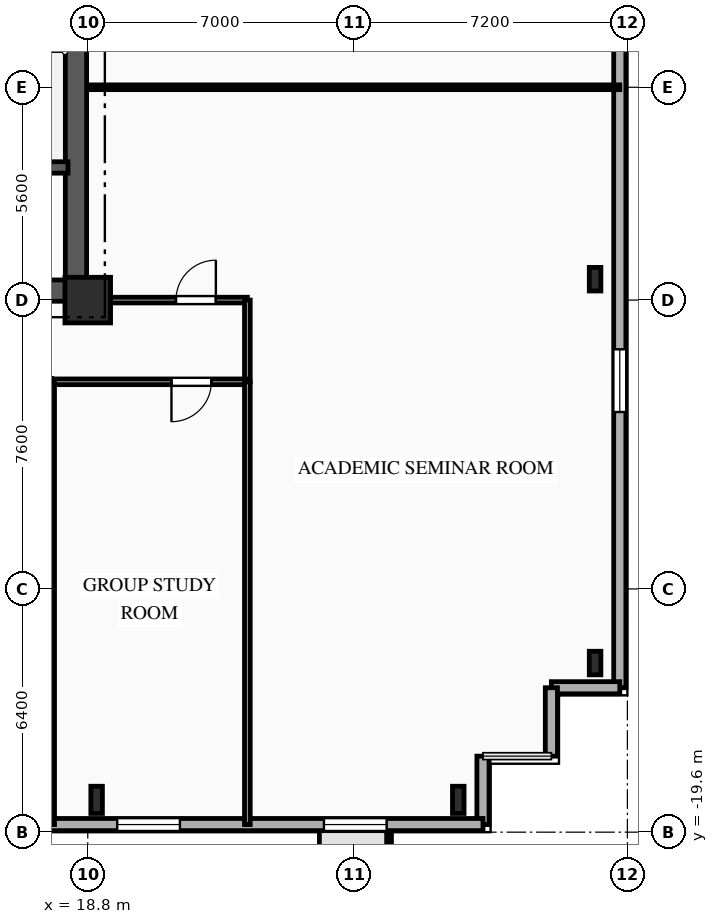
"""IFC4 building model, lengths in metres.
Left out: names, types, materials, properties, quantities, classifications, styles, units other than length and angle.
Written with IfcOpenShell. Run it as: python <this file> out.ifc"""

import sys

from ifc_helpers import new_model, si_unit, direction, frame, frame_2d, origin, origin_2d, place, context, subcontext, project, spatial, rectangle, i_section, extrude, element, fill, save


model = new_model("IFC4")
c1 = context("Model", 3, precision=1e-05, world=origin(), true_north=direction((0.0, 1.0)))
c2 = subcontext(c1, "Body", "Model", "MODEL_VIEW")
j1 = project(units=[si_unit("LENGTHUNIT", "METRE"), si_unit("PLANEANGLEUNIT", "RADIAN")], contexts=[c1])
p1 = place(None, origin())
s1 = spatial("IfcSite", under=j1, at=p1, CompositionType="ELEMENT")
p2 = place(p1, origin())
s2 = spatial("IfcBuilding", under=s1, at=p2, CompositionType="ELEMENT")
p3 = place(p2, frame((0.0, 0.0, 70.55)))
s3 = spatial("IfcBuildingStorey", under=s2, at=p3, CompositionType="ELEMENT", Elevation=70.55)
p4 = place(p3, frame((18.8, -5.6, 0.0), z_axis=(0.0, 0.0, 1.0), x_axis=(1.0, 0.0, 0.0)))
e1 = element("IfcColumn", 1, at=p4, inside=s3, PredefinedType="COLUMN", context=c2, shape_type="SweptSolid", body=[
    extrude(rectangle(XDim=1.2, YDim=1.2, at=origin_2d()), origin(), (0.0, 0.0, 1.0), 3.35),
])
for number, where, z_axis, x_axis in (
    (2, (19.033, -18.75, 0.0), (0.0, 0.0, 1.0), (1.0, 0.0, 0.0)),
    (3, (28.55, -18.75, 0.0), (0.0, 0.0, 1.0), (1.0, 0.0, 0.0)),
):
    element("IfcColumn", number, at=place(p3, frame(where, z_axis=z_axis, x_axis=x_axis)), inside=s3, PredefinedType="COLUMN", context=c2, shape_type="SweptSolid", body=[
        extrude(i_section(OverallWidth=0.304, OverallDepth=0.716, WebThickness=0.021, FlangeThickness=0.04, FilletRadius=0.027, at=origin_2d()), origin(), (0.0, 0.0, 1.0), 3.35),
    ])
for number, where, z_axis, x_axis in (
    (4, (32.15, -15.15, 0.0), (0.0, 0.0, 1.0), (1.0, 0.0, 0.0)),
    (5, (32.15, -5.05, 0.0), (0.0, 0.0, 1.0), (1.0, 0.0, 0.0)),
):
    element("IfcColumn", number, at=place(p3, frame(where, z_axis=z_axis, x_axis=x_axis)), inside=s3, PredefinedType="COLUMN", context=c2, shape_type="SweptSolid", body=[
        extrude(i_section(OverallWidth=0.305, OverallDepth=0.62, WebThickness=0.021, FlangeThickness=0.04, FilletRadius=0.027, at=origin_2d()), origin(), (0.0, 0.0, 1.0), 3.35),
    ])
p5 = place(p3, frame((32.8, 15.8, 0.0), z_axis=(0.0, 0.0, 1.0), x_axis=(0.0, -1.0, 0.0)))
e6 = element("IfcWall", 6, at=p5, inside=s3, PredefinedType="SOLIDWALL", context=c2, shape_type="SweptSolid", body=[
    extrude(rectangle(XDim=31.6, YDim=0.32, at=frame_2d((15.8, 0.0))), origin(), (0.0, 0.0, 1.0), 3.0),
])
p6 = place(p5, frame((7.36, 0.0, 0.85)))
e7 = element("IfcOpeningElement", 7, at=p6, cuts=e6, PredefinedType="OPENING", context=c2, shape_type="SweptSolid", body=[
    extrude(rectangle(XDim=1.6, YDim=1.85, at=frame_2d((0.8, 0.925))), frame((0.0, 0.17, 0.0), z_axis=(0.0, -1.0, 0.0), x_axis=(1.0, 0.0, 0.0)), (0.0, 0.0, 1.0), 0.34),
])
p7 = place(p5, frame((22.695, 0.0, 0.85)))
e8 = element("IfcOpeningElement", 8, at=p7, cuts=e6, PredefinedType="OPENING", context=c2, shape_type="SweptSolid", body=[
    extrude(rectangle(XDim=1.65, YDim=1.85, at=frame_2d((0.825, 0.925))), frame((0.0, 0.17, 0.0), z_axis=(0.0, -1.0, 0.0), x_axis=(1.0, 0.0, 0.0)), (0.0, 0.0, 1.0), 0.34),
])
for number, where, z_axis, x_axis in (
    (9, (32.8, -15.8, 0.0), (0.0, 0.0, 1.0), (-1.0, 0.0, 0.0)),
    (10, (31.0, -15.8, 0.0), (0.0, 0.0, 1.0), (0.0, -1.0, 0.0)),
):
    element("IfcWall", number, at=place(p3, frame(where, z_axis=z_axis, x_axis=x_axis)), inside=s3, PredefinedType="SOLIDWALL", context=c2, shape_type="SweptSolid", body=[
        extrude(rectangle(XDim=1.8, YDim=0.32, at=frame_2d((0.9, 0.0))), origin(), (0.0, 0.0, 1.0), 3.0),
    ])
p8 = place(p3, frame((29.2, -17.6, 0.0), z_axis=(0.0, 0.0, 1.0), x_axis=(0.0, -1.0, 0.0)))
e11 = element("IfcWall", 11, at=p8, inside=s3, PredefinedType="SOLIDWALL", context=c2, shape_type="SweptSolid", body=[
    extrude(rectangle(XDim=1.8, YDim=0.32, at=frame_2d((0.9, 0.0))), origin(), (0.0, 0.0, 1.0), 3.0),
])
p9 = place(p3, frame((29.2, -19.4, 0.0), z_axis=(0.0, 0.0, 1.0), x_axis=(-1.0, 0.0, 0.0)))
e12 = element("IfcWall", 12, at=p9, inside=s3, PredefinedType="SOLIDWALL", context=c2, shape_type="SweptSolid", body=[
    extrude(rectangle(XDim=58.4, YDim=0.32, at=frame_2d((29.2, 0.0))), origin(), (0.0, 0.0, 1.0), 3.0),
])
p10 = place(p9, frame((2.535, 0.0, 0.85)))
e13 = element("IfcOpeningElement", 13, at=p10, cuts=e12, PredefinedType="OPENING", context=c2, shape_type="SweptSolid", body=[
    extrude(rectangle(XDim=1.65, YDim=1.85, at=frame_2d((0.825, 0.925))), frame((0.0, 0.17, 0.0), z_axis=(0.0, -1.0, 0.0), x_axis=(1.0, 0.0, 0.0)), (0.0, 0.0, 1.0), 0.34),
])
p11 = place(p9, frame((7.975, 0.0, 0.85)))
e14 = element("IfcOpeningElement", 14, at=p11, cuts=e12, PredefinedType="OPENING", context=c2, shape_type="SweptSolid", body=[
    extrude(rectangle(XDim=1.65, YDim=1.85, at=frame_2d((0.825, 0.925))), frame((0.0, 0.17, 0.0), z_axis=(0.0, -1.0, 0.0), x_axis=(1.0, 0.0, 0.0)), (0.0, 0.0, 1.0), 0.34),
])
p12 = place(p9, frame((13.14, 0.0, 0.85)))
e15 = element("IfcOpeningElement", 15, at=p12, cuts=e12, PredefinedType="OPENING", context=c2, shape_type="SweptSolid", body=[
    extrude(rectangle(XDim=2.2, YDim=1.85, at=frame_2d((1.1, 0.925))), frame((0.0, 0.17, 0.0), z_axis=(0.0, -1.0, 0.0), x_axis=(1.0, 0.0, 0.0)), (0.0, 0.0, 1.0), 0.34),
])
p13 = place(p9, frame((19.992, 0.0, 0.85)))
e16 = element("IfcOpeningElement", 16, at=p13, cuts=e12, PredefinedType="OPENING", context=c2, shape_type="SweptSolid", body=[
    extrude(rectangle(XDim=2.2, YDim=1.85, at=frame_2d((1.1, 0.925))), frame((0.0, 0.17, 0.0), z_axis=(0.0, -1.0, 0.0), x_axis=(1.0, 0.0, 0.0)), (0.0, 0.0, 1.0), 0.34),
])
p14 = place(p9, frame((24.66, 0.0, 0.85)))
e17 = element("IfcOpeningElement", 17, at=p14, cuts=e12, PredefinedType="OPENING", context=c2, shape_type="SweptSolid", body=[
    extrude(rectangle(XDim=2.2, YDim=1.85, at=frame_2d((1.1, 0.925))), frame((0.0, 0.17, 0.0), z_axis=(0.0, -1.0, 0.0), x_axis=(1.0, 0.0, 0.0)), (0.0, 0.0, 1.0), 0.34),
])
p15 = place(p9, frame((30.42, 0.0, 0.85)))
e18 = element("IfcOpeningElement", 18, at=p15, cuts=e12, PredefinedType="OPENING", context=c2, shape_type="SweptSolid", body=[
    extrude(rectangle(XDim=2.2, YDim=1.85, at=frame_2d((1.1, 0.925))), frame((0.0, 0.17, 0.0), z_axis=(0.0, -1.0, 0.0), x_axis=(1.0, 0.0, 0.0)), (0.0, 0.0, 1.0), 0.34),
])
p16 = place(p9, frame((36.18, 0.0, 0.85)))
e19 = element("IfcOpeningElement", 19, at=p16, cuts=e12, PredefinedType="OPENING", context=c2, shape_type="SweptSolid", body=[
    extrude(rectangle(XDim=2.2, YDim=1.85, at=frame_2d((1.1, 0.925))), frame((0.0, 0.17, 0.0), z_axis=(0.0, -1.0, 0.0), x_axis=(1.0, 0.0, 0.0)), (0.0, 0.0, 1.0), 0.34),
])
p17 = place(p9, frame((41.94, 0.0, 0.85)))
e20 = element("IfcOpeningElement", 20, at=p17, cuts=e12, PredefinedType="OPENING", context=c2, shape_type="SweptSolid", body=[
    extrude(rectangle(XDim=2.2, YDim=1.85, at=frame_2d((1.1, 0.925))), frame((0.0, 0.17, 0.0), z_axis=(0.0, -1.0, 0.0), x_axis=(1.0, 0.0, 0.0)), (0.0, 0.0, 1.0), 0.34),
])
p18 = place(p9, frame((48.821, 0.0, 0.85)))
e21 = element("IfcOpeningElement", 21, at=p18, cuts=e12, PredefinedType="OPENING", context=c2, shape_type="SweptSolid", body=[
    extrude(rectangle(XDim=1.65, YDim=1.85, at=frame_2d((0.825, 0.925))), frame((0.0, 0.17, 0.0), z_axis=(0.0, -1.0, 0.0), x_axis=(1.0, 0.0, 0.0)), (0.0, 0.0, 1.0), 0.34),
])
p19 = place(p9, frame((53.775, 0.0, 0.85)))
e22 = element("IfcOpeningElement", 22, at=p19, cuts=e12, PredefinedType="OPENING", context=c2, shape_type="SweptSolid", body=[
    extrude(rectangle(XDim=1.65, YDim=1.85, at=frame_2d((0.825, 0.925))), frame((0.0, 0.17, 0.0), z_axis=(0.0, -1.0, 0.0), x_axis=(1.0, 0.0, 0.0)), (0.0, 0.0, 1.0), 0.34),
])
p20 = place(p3, frame((9.2, -5.35, 0.0), z_axis=(0.0, 0.0, 1.0), x_axis=(1.0, 0.0, 0.0)))
e23 = element("IfcWall", 23, at=p20, inside=s3, PredefinedType="SHEAR", context=c2, shape_type="SweptSolid", body=[
    extrude(rectangle(XDim=9.6, YDim=0.56, at=frame_2d((4.8, 0.0))), origin(), (0.0, 0.0, 1.0), 3.0),
])
p21 = place(p20, frame((7.65, 0.0, 0.0)))
e24 = element("IfcOpeningElement", 24, at=p21, cuts=e23, PredefinedType="OPENING", context=c2, shape_type="SweptSolid", body=[
    extrude(rectangle(XDim=0.9, YDim=2.1, at=frame_2d((0.45, 1.05))), frame((0.0, 0.29, 0.0), z_axis=(0.0, -1.0, 0.0), x_axis=(1.0, 0.0, 0.0)), (0.0, 0.0, 1.0), 0.58),
])
p22 = place(p3, frame((18.49, -5.05, 0.0), z_axis=(0.0, 0.0, 1.0), x_axis=(0.0, 1.0, 0.0)))
e25 = element("IfcWall", 25, at=p22, inside=s3, PredefinedType="SHEAR", context=c2, shape_type="SweptSolid", body=[
    extrude(rectangle(XDim=10.1, YDim=0.56, at=frame_2d((5.05, 0.0))), origin(), (0.0, 0.0, 1.0), 3.0),
])
p23 = place(p3, frame((15.1, -2.11, 0.0), z_axis=(0.0, 0.0, 1.0), x_axis=(1.0, 0.0, 0.0)))
e26 = element("IfcWall", 26, at=p23, inside=s3, PredefinedType="SHEAR", context=c2, shape_type="SweptSolid", body=[
    extrude(rectangle(XDim=3.18, YDim=0.3, at=frame_2d((1.59, 0.0))), origin(), (0.0, 0.0, 1.0), 3.0),
])
p24 = place(p3, frame((18.8, -5.6, 0.0), z_axis=(0.0, 0.0, 1.0), x_axis=(1.0, 0.0, 0.0)))
e27 = element("IfcWall", 27, at=p24, inside=s3, PredefinedType="PARTITIONING", context=c2, shape_type="SweptSolid", body=[
    extrude(rectangle(XDim=4.2, YDim=0.15, at=frame_2d((2.1, 0.0))), origin(), (0.0, 0.0, 1.0), 3.0),
])
p25 = place(p24, frame((2.321, 0.0, 0.0)))
e28 = element("IfcOpeningElement", 28, at=p25, cuts=e27, PredefinedType="OPENING", context=c2, shape_type="SweptSolid", body=[
    extrude(rectangle(XDim=1.05, YDim=2.15, at=frame_2d((0.525, 1.075))), frame((0.0, 0.085, 0.0), z_axis=(0.0, -1.0, 0.0), x_axis=(1.0, 0.0, 0.0)), (0.0, 0.0, 1.0), 0.17),
])
p26 = place(p3, frame((23.0, -5.6, 0.0), z_axis=(0.0, 0.0, 1.0), x_axis=(0.0, -1.0, 0.0)))
e29 = element("IfcWall", 29, at=p26, inside=s3, PredefinedType="PARTITIONING", context=c2, shape_type="SweptSolid", body=[
    extrude(rectangle(XDim=2.15, YDim=0.15, at=frame_2d((1.075, 0.0))), origin(), (0.0, 0.0, 1.0), 3.0),
])
p27 = place(p3, frame((23.0, -7.75, 0.0), z_axis=(0.0, 0.0, 1.0), x_axis=(-1.0, 0.0, 0.0)))
e30 = element("IfcWall", 30, at=p27, inside=s3, PredefinedType="PARTITIONING", context=c2, shape_type="SweptSolid", body=[
    extrude(rectangle(XDim=5.15, YDim=0.15, at=frame_2d((2.575, 0.0))), origin(), (0.0, 0.0, 1.0), 3.0),
])
p28 = place(p27, frame((0.948, 0.0, 0.0)))
e31 = element("IfcOpeningElement", 31, at=p28, cuts=e30, PredefinedType="OPENING", context=c2, shape_type="SweptSolid", body=[
    extrude(rectangle(XDim=1.05, YDim=2.15, at=frame_2d((0.525, 1.075))), frame((0.0, 0.085, 0.0), z_axis=(0.0, -1.0, 0.0), x_axis=(1.0, 0.0, 0.0)), (0.0, 0.0, 1.0), 0.17),
])
p29 = place(p3, frame((18.8, 0.0, 0.0), z_axis=(0.0, 0.0, 1.0), x_axis=(1.0, 0.0, 0.0)))
e32 = element("IfcWall", 32, at=p29, inside=s3, PredefinedType="PARTITIONING", context=c2, shape_type="SweptSolid", body=[
    extrude(rectangle(XDim=14.0, YDim=0.125, at=frame_2d((7.0, 0.0))), origin(), (0.0, 0.0, 1.0), 3.0),
])
for number, where, z_axis, x_axis in (
    (33, (23.0, -19.4, 0.0), (0.0, 0.0, 1.0), (0.0, 1.0, 0.0)),
    (34, (17.85, -7.75, 0.0), (0.0, 0.0, 1.0), (0.0, -1.0, 0.0)),
):
    element("IfcWall", number, at=place(p3, frame(where, z_axis=z_axis, x_axis=x_axis)), inside=s3, PredefinedType="PARTITIONING", context=c2, shape_type="SweptSolid", body=[
        extrude(rectangle(XDim=11.65, YDim=0.15, at=frame_2d((5.825, 0.0))), origin(), (0.0, 0.0, 1.0), 3.0),
    ])
p30 = place(p7, origin())
e35 = element("IfcWindow", 35, at=p30, inside=s3, PartitioningType="SINGLE_PANEL", PredefinedType="WINDOW", context=c2, shape_type="SweptSolid", body=[
    extrude(rectangle(XDim=1.65, YDim=1.85, at=frame_2d((0.825, 0.925))), frame((0.0, 0.03, 0.0), z_axis=(0.0, -1.0, 0.0), x_axis=(1.0, 0.0, 0.0)), (0.0, 0.0, 1.0), 0.06),
])
fill(e8, e35)
p31 = place(p10, origin())
e36 = element("IfcWindow", 36, at=p31, inside=s3, PartitioningType="SINGLE_PANEL", PredefinedType="WINDOW", context=c2, shape_type="SweptSolid", body=[
    extrude(rectangle(XDim=1.65, YDim=1.85, at=frame_2d((0.825, 0.925))), frame((0.0, 0.03, 0.0), z_axis=(0.0, -1.0, 0.0), x_axis=(1.0, 0.0, 0.0)), (0.0, 0.0, 1.0), 0.06),
])
fill(e13, e36)
p32 = place(p11, origin())
e37 = element("IfcWindow", 37, at=p32, inside=s3, PartitioningType="SINGLE_PANEL", PredefinedType="WINDOW", context=c2, shape_type="SweptSolid", body=[
    extrude(rectangle(XDim=1.65, YDim=1.85, at=frame_2d((0.825, 0.925))), frame((0.0, 0.03, 0.0), z_axis=(0.0, -1.0, 0.0), x_axis=(1.0, 0.0, 0.0)), (0.0, 0.0, 1.0), 0.06),
])
fill(e14, e37)
p33 = place(p25, origin())
e38 = element("IfcDoor", 38, at=p33, inside=s3, OperationType="SINGLE_SWING_RIGHT", PredefinedType="DOOR", context=c2, shape_type="SweptSolid", body=[
    extrude(rectangle(XDim=1.05, YDim=2.15, at=frame_2d((0.525, 1.075))), frame((0.0, 0.025, 0.0), z_axis=(0.0, -1.0, 0.0), x_axis=(1.0, 0.0, 0.0)), (0.0, 0.0, 1.0), 0.05),
])
fill(e28, e38)
p34 = place(p28, origin())
e39 = element("IfcDoor", 39, at=p34, inside=s3, OperationType="SINGLE_SWING_RIGHT", PredefinedType="DOOR", context=c2, shape_type="SweptSolid", body=[
    extrude(rectangle(XDim=1.05, YDim=2.15, at=frame_2d((0.525, 1.075))), frame((0.0, 0.025, 0.0), z_axis=(0.0, -1.0, 0.0), x_axis=(1.0, 0.0, 0.0)), (0.0, 0.0, 1.0), 0.05),
])
fill(e31, e39)
save(model, sys.argv[1])
